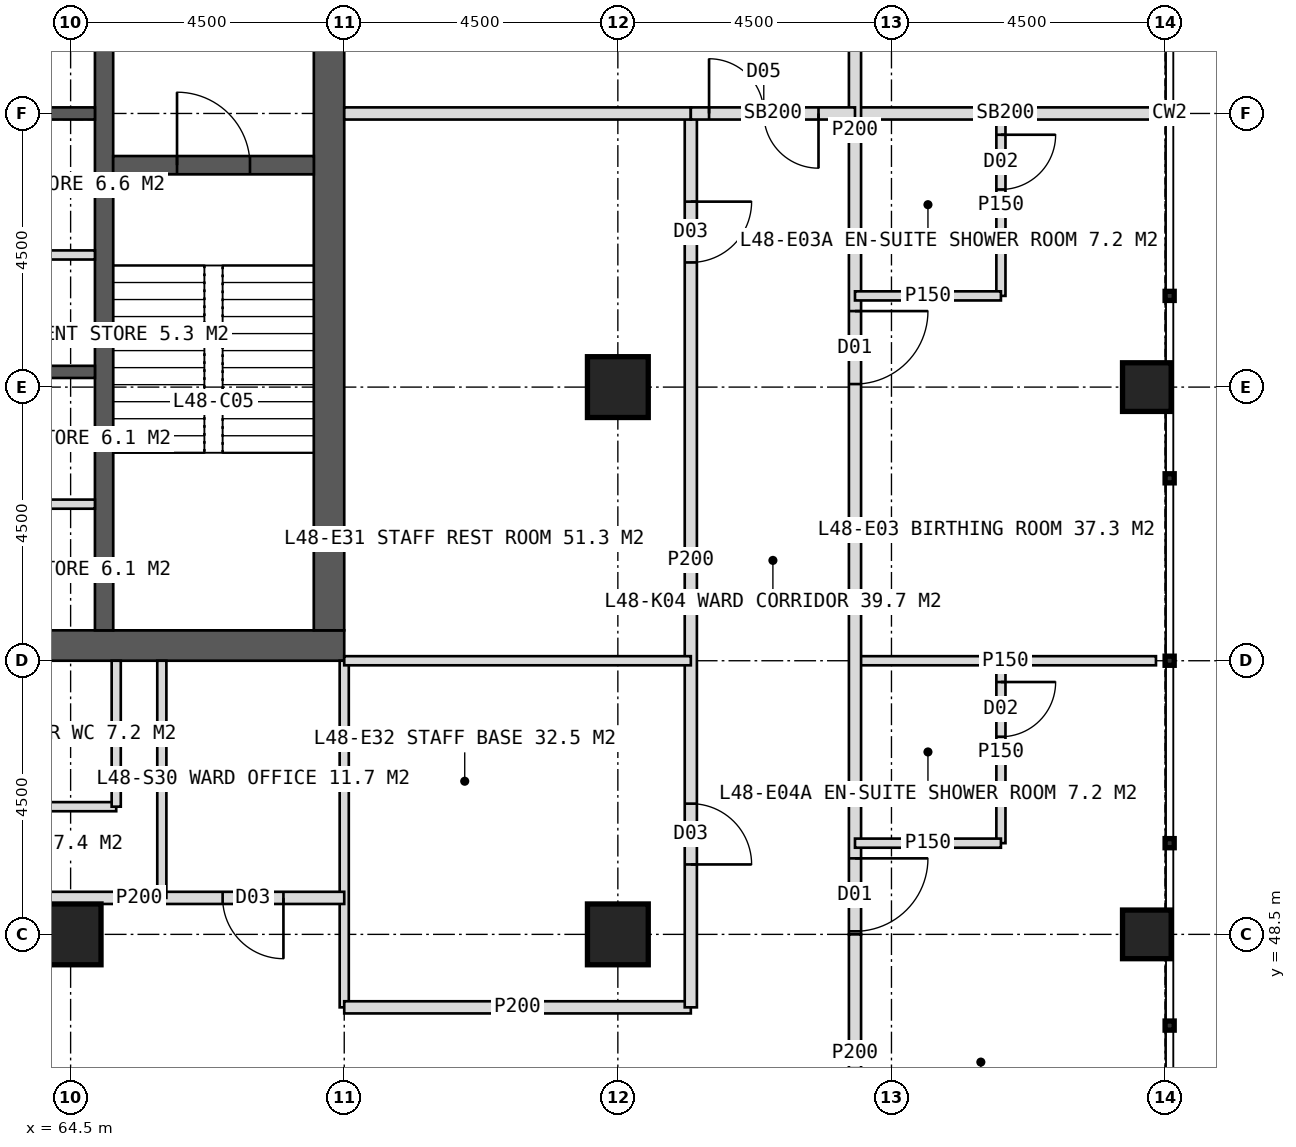
"""IFC4 building model, lengths in metres.
Left out: names, types, materials, properties, quantities, classifications, styles, units other than length and angle.
Written with IfcOpenShell. Run it as: python <this file> out.ifc"""

import sys

from ifc_helpers import new_model, si_unit, direction, frame, frame_2d, origin, origin_2d, place, context, subcontext, project, spatial, rectangle, hollow_rectangle, extrude, element, fill, save


model = new_model("IFC4")
c1 = context("Model", 3, precision=1e-05, world=origin(), true_north=direction((0.0, 1.0)))
c2 = subcontext(c1, "Body", "Model", "MODEL_VIEW")
j1 = project(units=[si_unit("LENGTHUNIT", "METRE"), si_unit("PLANEANGLEUNIT", "RADIAN")], contexts=[c1])
p1 = place(None, origin())
s1 = spatial("IfcSite", under=j1, at=p1, CompositionType="ELEMENT")
p2 = place(p1, origin())
s2 = spatial("IfcBuilding", under=s1, at=p2, CompositionType="ELEMENT")
p3 = place(p2, frame((0.0, 0.0, 201.0)))
s3 = spatial("IfcBuildingStorey", under=s2, at=p3, CompositionType="ELEMENT", Elevation=201.0)
p4 = place(p3, frame((51.0, 53.25, 0.0), z_axis=(0.0, 0.0, 1.0), x_axis=(1.0, 0.0, 0.0)))
e1 = element("IfcWall", 1, at=p4, inside=s3, PredefinedType="SHEAR", context=c2, shape_type="SweptSolid", body=[
    extrude(rectangle(XDim=18.0, YDim=0.5, at=frame_2d((9.0, 0.0))), origin(), (0.0, 0.0, 1.0), 4.0),
])
p5 = place(p4, frame((8.1, 0.0, 0.0)))
e2 = element("IfcOpeningElement", 2, at=p5, cuts=e1, PredefinedType="OPENING", context=c2, shape_type="SweptSolid", body=[
    extrude(rectangle(XDim=1.8, YDim=2.2, at=frame_2d((0.9, 1.1))), frame((0.0, 0.26, 0.0), z_axis=(0.0, -1.0, 0.0), x_axis=(1.0, 0.0, 0.0)), (0.0, 0.0, 1.0), 0.52),
])
p6 = place(p3, frame((68.75, 53.5, 0.0), z_axis=(0.0, 0.0, 1.0), x_axis=(0.0, 1.0, 0.0)))
e3 = element("IfcWall", 3, at=p6, inside=s3, PredefinedType="SHEAR", context=c2, shape_type="SweptSolid", body=[
    extrude(rectangle(XDim=17.0, YDim=0.5, at=frame_2d((8.5, 0.0))), origin(), (0.0, 0.0, 1.0), 4.0),
])
p7 = place(p6, frame((9.6, 0.0, 0.0)))
e4 = element("IfcOpeningElement", 4, at=p7, cuts=e3, PredefinedType="OPENING", context=c2, shape_type="SweptSolid", body=[
    extrude(rectangle(XDim=1.5, YDim=2.2, at=frame_2d((0.75, 1.1))), frame((0.0, 0.26, 0.0), z_axis=(0.0, -1.0, 0.0), x_axis=(1.0, 0.0, 0.0)), (0.0, 0.0, 1.0), 0.52),
])
p8 = place(p3, frame((65.05, 53.5, 0.0), z_axis=(0.0, 0.0, 1.0), x_axis=(0.0, 1.0, 0.0)))
e5 = element("IfcWall", 5, at=p8, inside=s3, PredefinedType="SHEAR", context=c2, shape_type="SweptSolid", body=[
    extrude(rectangle(XDim=17.0, YDim=0.3, at=frame_2d((8.5, 0.0))), origin(), (0.0, 0.0, 1.0), 4.0),
])
for number, where, z_axis, x_axis in (
    (6, (61.85, 57.75, 0.0), (0.0, 0.0, 1.0), (1.0, 0.0, 0.0)),
    (7, (61.85, 62.0, 0.0), (0.0, 0.0, 1.0), (1.0, 0.0, 0.0)),
):
    element("IfcWall", number, at=place(p3, frame(where, z_axis=z_axis, x_axis=x_axis)), inside=s3, PredefinedType="SHEAR", context=c2, shape_type="SweptSolid", body=[
        extrude(rectangle(XDim=3.05, YDim=0.2, at=frame_2d((1.525, 0.0))), origin(), (0.0, 0.0, 1.0), 4.0),
    ])
p9 = place(p3, frame((65.2, 61.15, 0.0), z_axis=(0.0, 0.0, 1.0), x_axis=(1.0, 0.0, 0.0)))
e8 = element("IfcWall", 8, at=p9, inside=s3, PredefinedType="SHEAR", context=c2, shape_type="SweptSolid", body=[
    extrude(rectangle(XDim=3.3, YDim=0.3, at=frame_2d((1.65, 0.0))), origin(), (0.0, 0.0, 1.0), 4.0),
])
p10 = place(p9, frame((1.05, 0.0, 0.0)))
e9 = element("IfcOpeningElement", 9, at=p10, cuts=e8, PredefinedType="OPENING", context=c2, shape_type="SweptSolid", body=[
    extrude(rectangle(XDim=1.2, YDim=2.1, at=frame_2d((0.6, 1.05))), frame((0.0, 0.16, 0.0), z_axis=(0.0, -1.0, 0.0), x_axis=(1.0, 0.0, 0.0)), (0.0, 0.0, 1.0), 0.32),
])
for number, where, z_axis, x_axis in (
    (10, (73.5, 48.5, 0.0), (0.0, 0.0, 1.0), (1.0, 0.0, 0.0)),
    (11, (64.5, 48.5, 0.0), (0.0, 0.0, 1.0), (1.0, 0.0, 0.0)),
    (12, (73.5, 57.5, 0.0), (0.0, 0.0, 1.0), (1.0, 0.0, 0.0)),
):
    element("IfcColumn", number, at=place(p3, frame(where, z_axis=z_axis, x_axis=x_axis)), inside=s3, PredefinedType="COLUMN", context=c2, shape_type="SweptSolid", body=[
        extrude(hollow_rectangle(XDim=1.0, YDim=1.0, WallThickness=0.1, at=origin_2d()), origin(), (0.0, 0.0, 1.0), 4.0),
    ])
for number, where, z_axis, x_axis in (
    (13, (82.2, 48.5, 0.0), (0.0, 0.0, 1.0), (1.0, 0.0, 0.0)),
    (14, (82.2, 57.5, 0.0), (0.0, 0.0, 1.0), (1.0, 0.0, 0.0)),
):
    element("IfcColumn", number, at=place(p3, frame(where, z_axis=z_axis, x_axis=x_axis)), inside=s3, PredefinedType="COLUMN", context=c2, shape_type="SweptSolid", body=[
        extrude(hollow_rectangle(XDim=0.8, YDim=0.8, WallThickness=0.08, at=origin_2d()), origin(), (0.0, 0.0, 1.0), 4.0),
    ])
p11 = place(p3, frame((69.0, 53.0, 0.0), z_axis=(0.0, 0.0, 1.0), x_axis=(0.0, -1.0, 0.0)))
e15 = element("IfcWall", 15, at=p11, inside=s3, PredefinedType="PARTITIONING", context=c2, shape_type="SweptSolid", body=[
    extrude(rectangle(XDim=5.7, YDim=0.15, at=frame_2d((2.85, 0.0))), origin(), (0.0, 0.0, 1.0), 3.75),
])
p12 = place(p3, frame((74.7, 47.3, 0.0), z_axis=(0.0, 0.0, 1.0), x_axis=(-1.0, 0.0, 0.0)))
e16 = element("IfcWall", 16, at=p12, inside=s3, PredefinedType="PARTITIONING", context=c2, shape_type="SweptSolid", body=[
    extrude(rectangle(XDim=5.7, YDim=0.2, at=frame_2d((2.85, 0.0))), origin(), (0.0, 0.0, 1.0), 3.75),
])
p13 = place(p3, frame((69.0, 49.1, 0.0), z_axis=(0.0, 0.0, 1.0), x_axis=(-1.0, 0.0, 0.0)))
e17 = element("IfcWall", 17, at=p13, inside=s3, PredefinedType="PARTITIONING", context=c2, shape_type="SweptSolid", body=[
    extrude(rectangle(XDim=6.75, YDim=0.2, at=frame_2d((3.375, 0.0))), origin(), (0.0, 0.0, 1.0), 3.75),
])
p14 = place(p13, frame((1.0, 0.0, 0.0)))
e18 = element("IfcOpeningElement", 18, at=p14, cuts=e17, PredefinedType="OPENING", context=c2, shape_type="SweptSolid", body=[
    extrude(rectangle(XDim=1.0, YDim=2.1, at=frame_2d((0.5, 1.05))), frame((0.0, 0.11, 0.0), z_axis=(0.0, -1.0, 0.0), x_axis=(1.0, 0.0, 0.0)), (0.0, 0.0, 1.0), 0.22),
])
p15 = place(p13, frame((5.425, 0.0, 0.0)))
e19 = element("IfcOpeningElement", 19, at=p15, cuts=e17, PredefinedType="OPENING", context=c2, shape_type="SweptSolid", body=[
    extrude(rectangle(XDim=1.0, YDim=2.1, at=frame_2d((0.5, 1.05))), frame((0.0, 0.11, 0.0), z_axis=(0.0, -1.0, 0.0), x_axis=(1.0, 0.0, 0.0)), (0.0, 0.0, 1.0), 0.22),
])
p16 = place(p3, frame((66.0, 53.0, 0.0), z_axis=(0.0, 0.0, 1.0), x_axis=(0.0, -1.0, 0.0)))
e20 = element("IfcWall", 20, at=p16, inside=s3, PredefinedType="PARTITIONING", context=c2, shape_type="SweptSolid", body=[
    extrude(rectangle(XDim=3.9, YDim=0.15, at=frame_2d((1.95, 0.0))), origin(), (0.0, 0.0, 1.0), 3.75),
])
p17 = place(p3, frame((65.25, 50.6, 0.0), z_axis=(0.0, 0.0, 1.0), x_axis=(-1.0, 0.0, 0.0)))
e21 = element("IfcWall", 21, at=p17, inside=s3, PredefinedType="PARTITIONING", context=c2, shape_type="SweptSolid", body=[
    extrude(rectangle(XDim=3.0, YDim=0.15, at=frame_2d((1.5, 0.0))), origin(), (0.0, 0.0, 1.0), 3.75),
])
p18 = place(p3, frame((65.25, 53.0, 0.0), z_axis=(0.0, 0.0, 1.0), x_axis=(0.0, -1.0, 0.0)))
e22 = element("IfcWall", 22, at=p18, inside=s3, PredefinedType="PARTITIONING", context=c2, shape_type="SweptSolid", body=[
    extrude(rectangle(XDim=2.4, YDim=0.15, at=frame_2d((1.2, 0.0))), origin(), (0.0, 0.0, 1.0), 3.75),
])
p19 = place(p3, frame((77.4, 62.0, 0.0), z_axis=(0.0, 0.0, 1.0), x_axis=(1.0, 0.0, 0.0)))
e23 = element("IfcWall", 23, at=p19, inside=s3, PredefinedType="SOLIDWALL", context=c2, shape_type="SweptSolid", body=[
    extrude(rectangle(XDim=4.95, YDim=0.2, at=frame_2d((2.475, 0.0))), origin(), (0.0, 0.0, 1.0), 2.95),
])
p20 = place(p3, frame((77.4, 53.0, 0.0), z_axis=(0.0, 0.0, 1.0), x_axis=(1.0, 0.0, 0.0)))
e24 = element("IfcWall", 24, at=p20, inside=s3, PredefinedType="PARTITIONING", context=c2, shape_type="SweptSolid", body=[
    extrude(rectangle(XDim=4.95, YDim=0.15, at=frame_2d((2.475, 0.0))), origin(), (0.0, 0.0, 1.0), 3.75),
])
p21 = place(p3, frame((77.4, 74.95, 0.0), z_axis=(0.0, 0.0, 1.0), x_axis=(0.0, -1.0, 0.0)))
e25 = element("IfcWall", 25, at=p21, inside=s3, PredefinedType="PARTITIONING", context=c2, shape_type="SweptSolid", body=[
    extrude(rectangle(XDim=26.45, YDim=0.2, at=frame_2d((13.225, 0.0))), origin(), (0.0, 0.0, 1.0), 3.75),
])
p22 = place(p21, frame((7.2, 0.0, 0.0)))
e26 = element("IfcOpeningElement", 26, at=p22, cuts=e25, PredefinedType="OPENING", context=c2, shape_type="SweptSolid", body=[
    extrude(rectangle(XDim=1.2, YDim=2.2, at=frame_2d((0.6, 1.1))), frame((0.0, 0.11, 0.0), z_axis=(0.0, -1.0, 0.0), x_axis=(1.0, 0.0, 0.0)), (0.0, 0.0, 1.0), 0.22),
])
p23 = place(p21, frame((16.2, 0.0, 0.0)))
e27 = element("IfcOpeningElement", 27, at=p23, cuts=e25, PredefinedType="OPENING", context=c2, shape_type="SweptSolid", body=[
    extrude(rectangle(XDim=1.2, YDim=2.2, at=frame_2d((0.6, 1.1))), frame((0.0, 0.11, 0.0), z_axis=(0.0, -1.0, 0.0), x_axis=(1.0, 0.0, 0.0)), (0.0, 0.0, 1.0), 0.22),
])
p24 = place(p21, frame((25.2, 0.0, 0.0)))
e28 = element("IfcOpeningElement", 28, at=p24, cuts=e25, PredefinedType="OPENING", context=c2, shape_type="SweptSolid", body=[
    extrude(rectangle(XDim=1.2, YDim=2.2, at=frame_2d((0.6, 1.1))), frame((0.0, 0.11, 0.0), z_axis=(0.0, -1.0, 0.0), x_axis=(1.0, 0.0, 0.0)), (0.0, 0.0, 1.0), 0.22),
])
p25 = place(p3, frame((77.4, 48.5, 0.0), z_axis=(0.0, 0.0, 1.0), x_axis=(0.0, -1.0, 0.0)))
e29 = element("IfcWall", 29, at=p25, inside=s3, PredefinedType="PARTITIONING", context=c2, shape_type="SweptSolid", body=[
    extrude(rectangle(XDim=3.9, YDim=0.2, at=frame_2d((1.95, 0.0))), origin(), (0.0, 0.0, 1.0), 2.85),
])
p26 = place(p3, frame((79.8, 62.0, 0.0), z_axis=(0.0, 0.0, 1.0), x_axis=(0.0, -1.0, 0.0)))
e30 = element("IfcWall", 30, at=p26, inside=s3, PredefinedType="PARTITIONING", context=c2, shape_type="SweptSolid", body=[
    extrude(rectangle(XDim=3.0, YDim=0.15, at=frame_2d((1.5, 0.0))), origin(), (0.0, 0.0, 1.0), 3.75),
])
p27 = place(p26, frame((0.35, 0.0, 0.0)))
e31 = element("IfcOpeningElement", 31, at=p27, cuts=e30, PredefinedType="OPENING", context=c2, shape_type="SweptSolid", body=[
    extrude(rectangle(XDim=0.9, YDim=2.1, at=frame_2d((0.45, 1.05))), frame((0.0, 0.085, 0.0), z_axis=(0.0, -1.0, 0.0), x_axis=(1.0, 0.0, 0.0)), (0.0, 0.0, 1.0), 0.17),
])
p28 = place(p3, frame((77.4, 59.0, 0.0), z_axis=(0.0, 0.0, 1.0), x_axis=(1.0, 0.0, 0.0)))
e32 = element("IfcWall", 32, at=p28, inside=s3, PredefinedType="PARTITIONING", context=c2, shape_type="SweptSolid", body=[
    extrude(rectangle(XDim=2.4, YDim=0.15, at=frame_2d((1.2, 0.0))), origin(), (0.0, 0.0, 1.0), 3.75),
])
p29 = place(p3, frame((79.8, 53.0, 0.0), z_axis=(0.0, 0.0, 1.0), x_axis=(0.0, -1.0, 0.0)))
e33 = element("IfcWall", 33, at=p29, inside=s3, PredefinedType="PARTITIONING", context=c2, shape_type="SweptSolid", body=[
    extrude(rectangle(XDim=3.0, YDim=0.15, at=frame_2d((1.5, 0.0))), origin(), (0.0, 0.0, 1.0), 3.75),
])
p30 = place(p29, frame((0.35, 0.0, 0.0)))
e34 = element("IfcOpeningElement", 34, at=p30, cuts=e33, PredefinedType="OPENING", context=c2, shape_type="SweptSolid", body=[
    extrude(rectangle(XDim=0.9, YDim=2.1, at=frame_2d((0.45, 1.05))), frame((0.0, 0.085, 0.0), z_axis=(0.0, -1.0, 0.0), x_axis=(1.0, 0.0, 0.0)), (0.0, 0.0, 1.0), 0.17),
])
p31 = place(p3, frame((77.4, 50.0, 0.0), z_axis=(0.0, 0.0, 1.0), x_axis=(1.0, 0.0, 0.0)))
e35 = element("IfcWall", 35, at=p31, inside=s3, PredefinedType="PARTITIONING", context=c2, shape_type="SweptSolid", body=[
    extrude(rectangle(XDim=2.4, YDim=0.15, at=frame_2d((1.2, 0.0))), origin(), (0.0, 0.0, 1.0), 3.75),
])
p32 = place(p3, frame((74.7, 62.0, 0.0), z_axis=(0.0, 0.0, 1.0), x_axis=(0.0, -1.0, 0.0)))
e36 = element("IfcWall", 36, at=p32, inside=s3, PredefinedType="PARTITIONING", context=c2, shape_type="SweptSolid", body=[
    extrude(rectangle(XDim=14.7, YDim=0.2, at=frame_2d((7.35, 0.0))), origin(), (0.0, 0.0, 1.0), 3.75),
])
p33 = place(p32, frame((1.45, 0.0, 0.0)))
e37 = element("IfcOpeningElement", 37, at=p33, cuts=e36, PredefinedType="OPENING", context=c2, shape_type="SweptSolid", body=[
    extrude(rectangle(XDim=1.0, YDim=2.1, at=frame_2d((0.5, 1.05))), frame((0.0, 0.11, 0.0), z_axis=(0.0, -1.0, 0.0), x_axis=(1.0, 0.0, 0.0)), (0.0, 0.0, 1.0), 0.22),
])
p34 = place(p32, frame((11.35, 0.0, 0.0)))
e38 = element("IfcOpeningElement", 38, at=p34, cuts=e36, PredefinedType="OPENING", context=c2, shape_type="SweptSolid", body=[
    extrude(rectangle(XDim=1.0, YDim=2.1, at=frame_2d((0.5, 1.05))), frame((0.0, 0.11, 0.0), z_axis=(0.0, -1.0, 0.0), x_axis=(1.0, 0.0, 0.0)), (0.0, 0.0, 1.0), 0.22),
])
p35 = place(p3, frame((69.0, 62.0, 0.0), z_axis=(0.0, 0.0, 1.0), x_axis=(1.0, 0.0, 0.0)))
e39 = element("IfcWall", 39, at=p35, inside=s3, PredefinedType="SOLIDWALL", context=c2, shape_type="SweptSolid", body=[
    extrude(rectangle(XDim=5.7, YDim=0.2, at=frame_2d((2.85, 0.0))), origin(), (0.0, 0.0, 1.0), 2.95),
])
p36 = place(p3, frame((69.0, 53.0, 0.0), z_axis=(0.0, 0.0, 1.0), x_axis=(1.0, 0.0, 0.0)))
e40 = element("IfcWall", 40, at=p36, inside=s3, PredefinedType="PARTITIONING", context=c2, shape_type="SweptSolid", body=[
    extrude(rectangle(XDim=5.7, YDim=0.15, at=frame_2d((2.85, 0.0))), origin(), (0.0, 0.0, 1.0), 3.75),
])
p37 = place(p3, frame((74.7, 62.0, 0.0), z_axis=(0.0, 0.0, 1.0), x_axis=(1.0, 0.0, 0.0)))
e41 = element("IfcWall", 41, at=p37, inside=s3, PredefinedType="SOLIDWALL", context=c2, shape_type="SweptSolid", body=[
    extrude(rectangle(XDim=2.7, YDim=0.2, at=frame_2d((1.35, 0.0))), origin(), (0.0, 0.0, 1.0), 2.95),
])
p38 = place(p37, frame((0.3, 0.0, 0.0)))
e42 = element("IfcOpeningElement", 42, at=p38, cuts=e41, PredefinedType="OPENING", context=c2, shape_type="SweptSolid", body=[
    extrude(rectangle(XDim=1.8, YDim=2.2, at=frame_2d((0.9, 1.1))), frame((0.0, 0.11, 0.0), z_axis=(0.0, -1.0, 0.0), x_axis=(1.0, 0.0, 0.0)), (0.0, 0.0, 1.0), 0.22),
])
for number, where, z_axis, x_axis in (
    (43, (61.85, 55.575, 0.0), (0.0, 0.0, 1.0), (1.0, 0.0, 0.0)),
    (44, (61.85, 59.673, 0.0), (0.0, 0.0, 1.0), (1.0, 0.0, 0.0)),
):
    element("IfcWall", number, at=place(p3, frame(where, z_axis=z_axis, x_axis=x_axis)), inside=s3, PredefinedType="PARTITIONING", context=c2, shape_type="SweptSolid", body=[
        extrude(rectangle(XDim=3.05, YDim=0.15, at=frame_2d((1.525, 0.0))), origin(), (0.0, 0.0, 1.0), 3.75),
    ])
p39 = place(p14, origin())
e45 = element("IfcDoor", 45, at=p39, inside=s3, OperationType="SINGLE_SWING_LEFT", PredefinedType="DOOR", context=c2, shape_type="SweptSolid", body=[
    extrude(rectangle(XDim=1.0, YDim=2.1, at=frame_2d((0.5, 1.05))), frame((0.0, 0.025, 0.0), z_axis=(0.0, -1.0, 0.0), x_axis=(1.0, 0.0, 0.0)), (0.0, 0.0, 1.0), 0.05),
])
fill(e18, e45)
p40 = place(p23, origin())
e46 = element("IfcDoor", 46, at=p40, inside=s3, OperationType="SINGLE_SWING_LEFT", PredefinedType="DOOR", context=c2, shape_type="SweptSolid", body=[
    extrude(rectangle(XDim=1.2, YDim=2.2, at=frame_2d((0.6, 1.1))), frame((0.0, 0.025, 0.0), z_axis=(0.0, -1.0, 0.0), x_axis=(1.0, 0.0, 0.0)), (0.0, 0.0, 1.0), 0.05),
])
fill(e27, e46)
p41 = place(p27, origin())
e47 = element("IfcDoor", 47, at=p41, inside=s3, OperationType="SINGLE_SWING_LEFT", PredefinedType="DOOR", context=c2, shape_type="SweptSolid", body=[
    extrude(rectangle(XDim=0.9, YDim=2.1, at=frame_2d((0.45, 1.05))), frame((0.0, 0.025, 0.0), z_axis=(0.0, -1.0, 0.0), x_axis=(1.0, 0.0, 0.0)), (0.0, 0.0, 1.0), 0.05),
])
fill(e31, e47)
p42 = place(p24, origin())
e48 = element("IfcDoor", 48, at=p42, inside=s3, OperationType="SINGLE_SWING_LEFT", PredefinedType="DOOR", context=c2, shape_type="SweptSolid", body=[
    extrude(rectangle(XDim=1.2, YDim=2.2, at=frame_2d((0.6, 1.1))), frame((0.0, 0.025, 0.0), z_axis=(0.0, -1.0, 0.0), x_axis=(1.0, 0.0, 0.0)), (0.0, 0.0, 1.0), 0.05),
])
fill(e28, e48)
p43 = place(p30, origin())
e49 = element("IfcDoor", 49, at=p43, inside=s3, OperationType="SINGLE_SWING_LEFT", PredefinedType="DOOR", context=c2, shape_type="SweptSolid", body=[
    extrude(rectangle(XDim=0.9, YDim=2.1, at=frame_2d((0.45, 1.05))), frame((0.0, 0.025, 0.0), z_axis=(0.0, -1.0, 0.0), x_axis=(1.0, 0.0, 0.0)), (0.0, 0.0, 1.0), 0.05),
])
fill(e34, e49)
p44 = place(p33, origin())
e50 = element("IfcDoor", 50, at=p44, inside=s3, OperationType="SINGLE_SWING_LEFT", PredefinedType="DOOR", context=c2, shape_type="SweptSolid", body=[
    extrude(rectangle(XDim=1.0, YDim=2.1, at=frame_2d((0.5, 1.05))), frame((0.0, 0.025, 0.0), z_axis=(0.0, -1.0, 0.0), x_axis=(1.0, 0.0, 0.0)), (0.0, 0.0, 1.0), 0.05),
])
fill(e37, e50)
p45 = place(p34, origin())
e51 = element("IfcDoor", 51, at=p45, inside=s3, OperationType="SINGLE_SWING_RIGHT", PredefinedType="DOOR", context=c2, shape_type="SweptSolid", body=[
    extrude(rectangle(XDim=1.0, YDim=2.1, at=frame_2d((0.5, 1.05))), frame((0.0, 0.025, 0.0), z_axis=(0.0, -1.0, 0.0), x_axis=(1.0, 0.0, 0.0)), (0.0, 0.0, 1.0), 0.05),
])
fill(e38, e51)
p46 = place(p38, origin())
e52 = element("IfcDoor", 52, at=p46, inside=s3, OperationType="DOUBLE_DOOR_DOUBLE_SWING", PredefinedType="DOOR", context=c2, shape_type="SweptSolid", body=[
    extrude(rectangle(XDim=1.8, YDim=2.2, at=frame_2d((0.9, 1.1))), frame((0.0, 0.025, 0.0), z_axis=(0.0, -1.0, 0.0), x_axis=(1.0, 0.0, 0.0)), (0.0, 0.0, 1.0), 0.05),
])
fill(e42, e52)
p47 = place(p10, origin())
e53 = element("IfcDoor", 53, at=p47, inside=s3, OperationType="SINGLE_SWING_LEFT", PredefinedType="DOOR", context=c2, shape_type="SweptSolid", body=[
    extrude(rectangle(XDim=1.2, YDim=2.1, at=frame_2d((0.6, 1.05))), frame((0.0, 0.025, 0.0), z_axis=(0.0, -1.0, 0.0), x_axis=(1.0, 0.0, 0.0)), (0.0, 0.0, 1.0), 0.05),
])
fill(e9, e53)
save(model, sys.argv[1])
